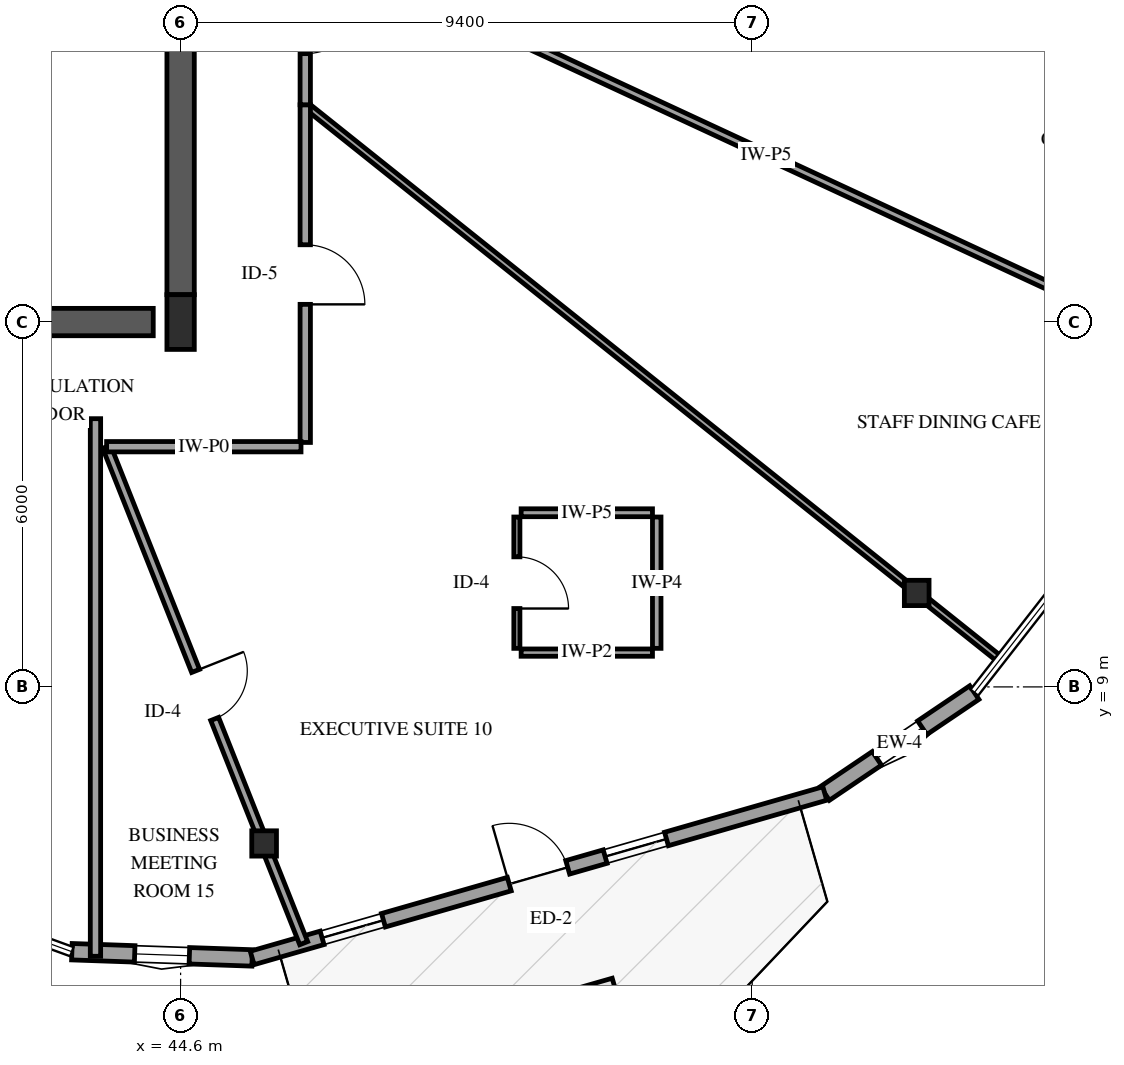
"""IFC4 building model, lengths in metres.
Left out: names, types, materials, properties, quantities, classifications, styles, units other than length and angle.
Written with IfcOpenShell. Run it as: python <this file> out.ifc"""

import sys

from ifc_helpers import new_model, si_unit, direction, frame, frame_2d, origin, origin_2d, place, context, subcontext, project, spatial, rectangle, i_section, extrude, element, fill, save


model = new_model("IFC4")
c1 = context("Model", 3, precision=1e-05, world=origin(), true_north=direction((0.0, 1.0)))
c2 = subcontext(c1, "Body", "Model", "MODEL_VIEW")
j1 = project(units=[si_unit("LENGTHUNIT", "METRE"), si_unit("PLANEANGLEUNIT", "RADIAN")], contexts=[c1])
p1 = place(None, origin())
s1 = spatial("IfcSite", under=j1, at=p1, CompositionType="ELEMENT")
p2 = place(p1, origin())
s2 = spatial("IfcBuilding", under=s1, at=p2, CompositionType="ELEMENT")
p3 = place(p2, frame((0.0, 0.0, 223.0)))
s3 = spatial("IfcBuildingStorey", under=s2, at=p3, CompositionType="ELEMENT", Elevation=223.0)
p4 = place(p3, frame((41.3, 15.0, 0.0), z_axis=(0.0, 0.0, 1.0), x_axis=(1.0, 0.0, 0.0)))
e1 = element("IfcWall", 1, at=p4, inside=s3, PredefinedType="SHEAR", context=c2, shape_type="SweptSolid", body=[
    extrude(rectangle(XDim=2.85, YDim=0.45, at=frame_2d((1.425, 0.0))), origin(), (0.0, 0.0, 1.0), 3.6),
])
p5 = place(p3, frame((44.6, 15.45, 0.0), z_axis=(0.0, 0.0, 1.0), x_axis=(0.0, 1.0, 0.0)))
e2 = element("IfcWall", 2, at=p5, inside=s3, PredefinedType="SHEAR", context=c2, shape_type="SweptSolid", body=[
    extrude(rectangle(XDim=6.35, YDim=0.45, at=frame_2d((3.175, 0.0))), origin(), (0.0, 0.0, 1.0), 3.6),
])
p6 = place(p3, frame((44.6, 15.0, 0.0), z_axis=(0.0, 0.0, 1.0), x_axis=(1.0, 0.0, 0.0)))
e3 = element("IfcColumn", 3, at=p6, inside=s3, PredefinedType="PILASTER", context=c2, shape_type="SweptSolid", body=[
    extrude(rectangle(XDim=0.45, YDim=0.9, at=origin_2d()), origin(), (0.0, 0.0, 1.0), 3.6),
])
for number, where, z_axis, x_axis in (
    (4, (45.973, 6.426, 0.0), (0.0, 0.0, 1.0), (1.0, 0.0, 0.0)),
    (5, (56.705, 10.545, 0.0), (0.0, 0.0, 1.0), (1.0, 0.0, 0.0)),
):
    element("IfcColumn", number, at=place(p3, frame(where, z_axis=z_axis, x_axis=x_axis)), inside=s3, PredefinedType="COLUMN", context=c2, shape_type="SweptSolid", body=[
        extrude(i_section(OverallWidth=0.406, OverallDepth=0.416, WebThickness=0.03, FlangeThickness=0.048, FilletRadius=0.038, at=origin_2d()), origin(), (0.0, 0.0, 1.0), 3.6),
    ])
p7 = place(p3, frame((42.812, 4.646, 0.0), z_axis=(0.0, 0.0, 1.0), x_axis=(0.999402475551, -0.034564314866, 0.0)))
e6 = element("IfcWall", 6, at=p7, inside=s3, PredefinedType="SOLIDWALL", context=c2, shape_type="SweptSolid", body=[
    extrude(rectangle(XDim=2.967, YDim=0.27, at=frame_2d((1.483, 0.0))), origin(), (0.0, 0.0, 1.0), 2.679),
])
p8 = place(p7, frame((1.033, 0.0, 0.75)))
e7 = element("IfcOpeningElement", 7, at=p8, cuts=e6, PredefinedType="OPENING", context=c2, shape_type="SweptSolid", body=[
    extrude(rectangle(XDim=0.9, YDim=1.5, at=frame_2d((0.45, 0.75))), frame((0.0, 0.145, 0.0), z_axis=(0.0, -1.0, 0.0), x_axis=(1.0, 0.0, 0.0)), (0.0, 0.0, 1.0), 0.29),
])
p9 = place(p3, frame((55.194, 7.247, 0.0), z_axis=(0.0, 0.0, 1.0), x_axis=(0.828845811755, 0.559477095453, 0.0)))
e8 = element("IfcWall", 8, at=p9, inside=s3, PredefinedType="SOLIDWALL", context=c2, shape_type="SweptSolid", body=[
    extrude(rectangle(XDim=2.967, YDim=0.27, at=frame_2d((1.483, 0.0))), origin(), (0.0, 0.0, 1.0), 2.679),
])
p10 = place(p9, frame((1.033, 0.0, 0.75)))
e9 = element("IfcOpeningElement", 9, at=p10, cuts=e8, PredefinedType="OPENING", context=c2, shape_type="SweptSolid", body=[
    extrude(rectangle(XDim=0.9, YDim=1.5, at=frame_2d((0.45, 0.75))), frame((0.0, 0.145, 0.0), z_axis=(0.0, -1.0, 0.0), x_axis=(1.0, 0.0, 0.0)), (0.0, 0.0, 1.0), 0.29),
])
p11 = place(p3, frame((45.777, 4.543, 0.0), z_axis=(0.0, 0.0, 1.0), x_axis=(0.961166762437, 0.275968213361, 0.0)))
e10 = element("IfcWall", 10, at=p11, inside=s3, PredefinedType="SOLIDWALL", context=c2, shape_type="SweptSolid", body=[
    extrude(rectangle(XDim=9.798, YDim=0.23, at=frame_2d((4.899, 0.0))), origin(), (0.0, 0.0, 1.0), 2.679),
])
p12 = place(p11, frame((4.399, 0.0, 0.0)))
e11 = element("IfcOpeningElement", 11, at=p12, cuts=e10, PredefinedType="OPENING", context=c2, shape_type="SweptSolid", body=[
    extrude(rectangle(XDim=1.0, YDim=2.15, at=frame_2d((0.5, 1.075))), frame((0.0, 0.125, 0.0), z_axis=(0.0, -1.0, 0.0), x_axis=(1.0, 0.0, 0.0)), (0.0, 0.0, 1.0), 0.25),
])
p13 = place(p11, frame((1.196, 0.0, 0.72)))
e12 = element("IfcOpeningElement", 12, at=p13, cuts=e10, PredefinedType="OPENING", context=c2, shape_type="SweptSolid", body=[
    extrude(rectangle(XDim=1.05, YDim=1.55, at=frame_2d((0.525, 0.775))), frame((0.0, 0.125, 0.0), z_axis=(0.0, -1.0, 0.0), x_axis=(1.0, 0.0, 0.0)), (0.0, 0.0, 1.0), 0.25),
])
p14 = place(p11, frame((6.039, 0.0, 0.72)))
e13 = element("IfcOpeningElement", 13, at=p14, cuts=e10, PredefinedType="OPENING", context=c2, shape_type="SweptSolid", body=[
    extrude(rectangle(XDim=1.05, YDim=1.55, at=frame_2d((0.525, 0.775))), frame((0.0, 0.125, 0.0), z_axis=(0.0, -1.0, 0.0), x_axis=(1.0, 0.0, 0.0)), (0.0, 0.0, 1.0), 0.25),
])
p15 = place(p3, frame((46.65, 21.265, 0.0), z_axis=(0.0, 0.0, 1.0), x_axis=(0.907138854203, -0.420831437984, 0.0)))
e14 = element("IfcWall", 14, at=p15, inside=s3, PredefinedType="PARTITIONING", context=c2, shape_type="SweptSolid", body=[
    extrude(rectangle(XDim=16.712, YDim=0.13, at=frame_2d((8.356, 0.0))), origin(), (0.0, 0.0, 1.0), 3.3),
])
p16 = place(p3, frame((46.65, 18.573, 0.0), z_axis=(0.0, 0.0, 1.0), x_axis=(0.781487424424, -0.623920992968, 0.0)))
e15 = element("IfcWall", 15, at=p16, inside=s3, PredefinedType="PARTITIONING", context=c2, shape_type="SweptSolid", body=[
    extrude(rectangle(XDim=14.622, YDim=0.11, at=frame_2d((7.311, 0.0))), origin(), (0.0, 0.0, 1.0), 3.3),
])
p17 = place(p3, frame((43.383, 12.95, 0.0), z_axis=(0.0, 0.0, 1.0), x_axis=(0.368969393474, -0.929441545596, 0.0)))
e16 = element("IfcWall", 16, at=p17, inside=s3, PredefinedType="PARTITIONING", context=c2, shape_type="SweptSolid", body=[
    extrude(rectangle(XDim=8.784, YDim=0.14, at=frame_2d((4.392, 0.0))), origin(), (0.0, 0.0, 1.0), 2.595),
])
p18 = place(p17, frame((3.967, 0.0, 0.0)))
e17 = element("IfcOpeningElement", 17, at=p18, cuts=e16, PredefinedType="OPENING", context=c2, shape_type="SweptSolid", body=[
    extrude(rectangle(XDim=0.85, YDim=2.1, at=frame_2d((0.425, 1.05))), frame((0.0, 0.08, 0.0), z_axis=(0.0, -1.0, 0.0), x_axis=(1.0, 0.0, 0.0)), (0.0, 0.0, 1.0), 0.16),
])
p19 = place(p3, frame((46.65, 18.573, 0.0), z_axis=(0.0, 0.0, 1.0), x_axis=(0.0, -1.0, 0.0)))
e18 = element("IfcWall", 18, at=p19, inside=s3, PredefinedType="PARTITIONING", context=c2, shape_type="SweptSolid", body=[
    extrude(rectangle(XDim=5.553, YDim=0.17, at=frame_2d((2.776, 0.0))), origin(), (0.0, 0.0, 1.0), 3.3),
])
p20 = place(p19, frame((2.302, 0.0, 0.0)))
e19 = element("IfcOpeningElement", 19, at=p20, cuts=e18, PredefinedType="OPENING", context=c2, shape_type="SweptSolid", body=[
    extrude(rectangle(XDim=0.98, YDim=2.15, at=frame_2d((0.49, 1.075))), frame((0.0, 0.095, 0.0), z_axis=(0.0, -1.0, 0.0), x_axis=(1.0, 0.0, 0.0)), (0.0, 0.0, 1.0), 0.19),
])
p21 = place(p3, frame((46.58, 12.95, 0.0), z_axis=(0.0, 0.0, 1.0), x_axis=(-1.0, 0.0, 0.0)))
e20 = element("IfcWall", 20, at=p21, inside=s3, PredefinedType="PARTITIONING", context=c2, shape_type="SweptSolid", body=[
    extrude(rectangle(XDim=3.197, YDim=0.17, at=frame_2d((1.599, 0.0))), origin(), (0.0, 0.0, 1.0), 3.3),
])
p22 = place(p3, frame((46.65, 21.265, 0.0), z_axis=(0.0, 0.0, 1.0), x_axis=(0.0, -1.0, 0.0)))
e21 = element("IfcWall", 21, at=p22, inside=s3, PredefinedType="PARTITIONING", context=c2, shape_type="SweptSolid", body=[
    extrude(rectangle(XDim=2.692, YDim=0.17, at=frame_2d((1.346, 0.0))), origin(), (0.0, 0.0, 1.0), 3.3),
])
p23 = place(p22, frame((0.871, 0.0, 0.0)))
e22 = element("IfcOpeningElement", 22, at=p23, cuts=e21, PredefinedType="OPENING", context=c2, shape_type="SweptSolid", body=[
    extrude(rectangle(XDim=0.98, YDim=2.15, at=frame_2d((0.49, 1.075))), frame((0.0, 0.095, 0.0), z_axis=(0.0, -1.0, 0.0), x_axis=(1.0, 0.0, 0.0)), (0.0, 0.0, 1.0), 0.19),
])
p24 = place(p3, frame((50.13, 11.794, 0.0), z_axis=(0.0, 0.0, 1.0), x_axis=(0.0, -1.0, 0.0)))
e23 = element("IfcWall", 23, at=p24, inside=s3, PredefinedType="PARTITIONING", context=c2, shape_type="SweptSolid", body=[
    extrude(rectangle(XDim=2.16, YDim=0.1, at=frame_2d((1.08, 0.0))), origin(), (0.0, 0.0, 1.0), 3.3),
])
p25 = place(p24, frame((0.655, 0.0, 0.0)))
e24 = element("IfcOpeningElement", 24, at=p25, cuts=e23, PredefinedType="OPENING", context=c2, shape_type="SweptSolid", body=[
    extrude(rectangle(XDim=0.85, YDim=2.1, at=frame_2d((0.425, 1.05))), frame((0.0, 0.06, 0.0), z_axis=(0.0, -1.0, 0.0), x_axis=(1.0, 0.0, 0.0)), (0.0, 0.0, 1.0), 0.12),
])
p26 = place(p3, frame((52.43, 9.634, 0.0), z_axis=(0.0, 0.0, 1.0), x_axis=(0.0, 1.0, 0.0)))
e25 = element("IfcWall", 25, at=p26, inside=s3, PredefinedType="PARTITIONING", context=c2, shape_type="SweptSolid", body=[
    extrude(rectangle(XDim=2.16, YDim=0.14, at=frame_2d((1.08, 0.0))), origin(), (0.0, 0.0, 1.0), 3.3),
])
p27 = place(p3, frame((52.36, 11.864, 0.0), z_axis=(0.0, 0.0, 1.0), x_axis=(-1.0, 0.0, 0.0)))
e26 = element("IfcWall", 26, at=p27, inside=s3, PredefinedType="PARTITIONING", context=c2, shape_type="SweptSolid", body=[
    extrude(rectangle(XDim=2.16, YDim=0.13, at=frame_2d((1.08, 0.0))), origin(), (0.0, 0.0, 1.0), 3.3),
])
p28 = place(p3, frame((50.2, 9.564, 0.0), z_axis=(0.0, 0.0, 1.0), x_axis=(1.0, 0.0, 0.0)))
e27 = element("IfcWall", 27, at=p28, inside=s3, PredefinedType="PARTITIONING", context=c2, shape_type="SweptSolid", body=[
    extrude(rectangle(XDim=2.16, YDim=0.12, at=frame_2d((1.08, 0.0))), origin(), (0.0, 0.0, 1.0), 3.3),
])
p29 = place(p3, frame((43.2, 13.411, 0.0), z_axis=(0.0, 0.0, 1.0), x_axis=(0.0, -1.0, 0.0)))
e28 = element("IfcWall", 28, at=p29, inside=s3, PredefinedType="PARTITIONING", context=c2, shape_type="SweptSolid", body=[
    extrude(rectangle(XDim=8.841, YDim=0.17, at=frame_2d((4.42, 0.0))), origin(), (0.0, 0.0, 1.0), 3.3),
])
p30 = place(p8, origin())
e29 = element("IfcWindow", 29, at=p30, inside=s3, PartitioningType="SINGLE_PANEL", PredefinedType="WINDOW", context=c2, shape_type="SweptSolid", body=[
    extrude(rectangle(XDim=0.9, YDim=1.5, at=frame_2d((0.45, 0.75))), frame((0.0, 0.03, 0.0), z_axis=(0.0, -1.0, 0.0), x_axis=(1.0, 0.0, 0.0)), (0.0, 0.0, 1.0), 0.06),
])
fill(e7, e29)
p31 = place(p10, origin())
e30 = element("IfcWindow", 30, at=p31, inside=s3, PartitioningType="SINGLE_PANEL", PredefinedType="WINDOW", context=c2, shape_type="SweptSolid", body=[
    extrude(rectangle(XDim=0.9, YDim=1.5, at=frame_2d((0.45, 0.75))), frame((0.0, 0.03, 0.0), z_axis=(0.0, -1.0, 0.0), x_axis=(1.0, 0.0, 0.0)), (0.0, 0.0, 1.0), 0.06),
])
fill(e9, e30)
p32 = place(p12, origin())
e31 = element("IfcDoor", 31, at=p32, inside=s3, OperationType="SINGLE_SWING_LEFT", PredefinedType="DOOR", context=c2, shape_type="SweptSolid", body=[
    extrude(rectangle(XDim=1.0, YDim=2.15, at=frame_2d((0.5, 1.075))), frame((0.0, 0.025, 0.0), z_axis=(0.0, -1.0, 0.0), x_axis=(1.0, 0.0, 0.0)), (0.0, 0.0, 1.0), 0.05),
])
fill(e11, e31)
p33 = place(p13, origin())
e32 = element("IfcWindow", 32, at=p33, inside=s3, PartitioningType="SINGLE_PANEL", PredefinedType="WINDOW", context=c2, shape_type="SweptSolid", body=[
    extrude(rectangle(XDim=1.05, YDim=1.55, at=frame_2d((0.525, 0.775))), frame((0.0, 0.03, 0.0), z_axis=(0.0, -1.0, 0.0), x_axis=(1.0, 0.0, 0.0)), (0.0, 0.0, 1.0), 0.06),
])
fill(e12, e32)
p34 = place(p14, origin())
e33 = element("IfcWindow", 33, at=p34, inside=s3, PartitioningType="SINGLE_PANEL", PredefinedType="WINDOW", context=c2, shape_type="SweptSolid", body=[
    extrude(rectangle(XDim=1.05, YDim=1.55, at=frame_2d((0.525, 0.775))), frame((0.0, 0.03, 0.0), z_axis=(0.0, -1.0, 0.0), x_axis=(1.0, 0.0, 0.0)), (0.0, 0.0, 1.0), 0.06),
])
fill(e13, e33)
p35 = place(p18, origin())
e34 = element("IfcDoor", 34, at=p35, inside=s3, OperationType="SINGLE_SWING_LEFT", PredefinedType="DOOR", context=c2, shape_type="SweptSolid", body=[
    extrude(rectangle(XDim=0.85, YDim=2.1, at=frame_2d((0.425, 1.05))), frame((0.0, 0.025, 0.0), z_axis=(0.0, -1.0, 0.0), x_axis=(1.0, 0.0, 0.0)), (0.0, 0.0, 1.0), 0.05),
])
fill(e17, e34)
p36 = place(p20, origin())
e35 = element("IfcDoor", 35, at=p36, inside=s3, OperationType="SINGLE_SWING_RIGHT", PredefinedType="DOOR", context=c2, shape_type="SweptSolid", body=[
    extrude(rectangle(XDim=0.98, YDim=2.15, at=frame_2d((0.49, 1.075))), frame((0.0, 0.025, 0.0), z_axis=(0.0, -1.0, 0.0), x_axis=(1.0, 0.0, 0.0)), (0.0, 0.0, 1.0), 0.05),
])
fill(e19, e35)
p37 = place(p23, origin())
e36 = element("IfcDoor", 36, at=p37, inside=s3, OperationType="SINGLE_SWING_LEFT", PredefinedType="DOOR", context=c2, shape_type="SweptSolid", body=[
    extrude(rectangle(XDim=0.98, YDim=2.15, at=frame_2d((0.49, 1.075))), frame((0.0, 0.025, 0.0), z_axis=(0.0, -1.0, 0.0), x_axis=(1.0, 0.0, 0.0)), (0.0, 0.0, 1.0), 0.05),
])
fill(e22, e36)
p38 = place(p25, origin())
e37 = element("IfcDoor", 37, at=p38, inside=s3, OperationType="SINGLE_SWING_RIGHT", PredefinedType="DOOR", context=c2, shape_type="SweptSolid", body=[
    extrude(rectangle(XDim=0.85, YDim=2.1, at=frame_2d((0.425, 1.05))), frame((0.0, 0.025, 0.0), z_axis=(0.0, -1.0, 0.0), x_axis=(1.0, 0.0, 0.0)), (0.0, 0.0, 1.0), 0.05),
])
fill(e24, e37)
save(model, sys.argv[1])
